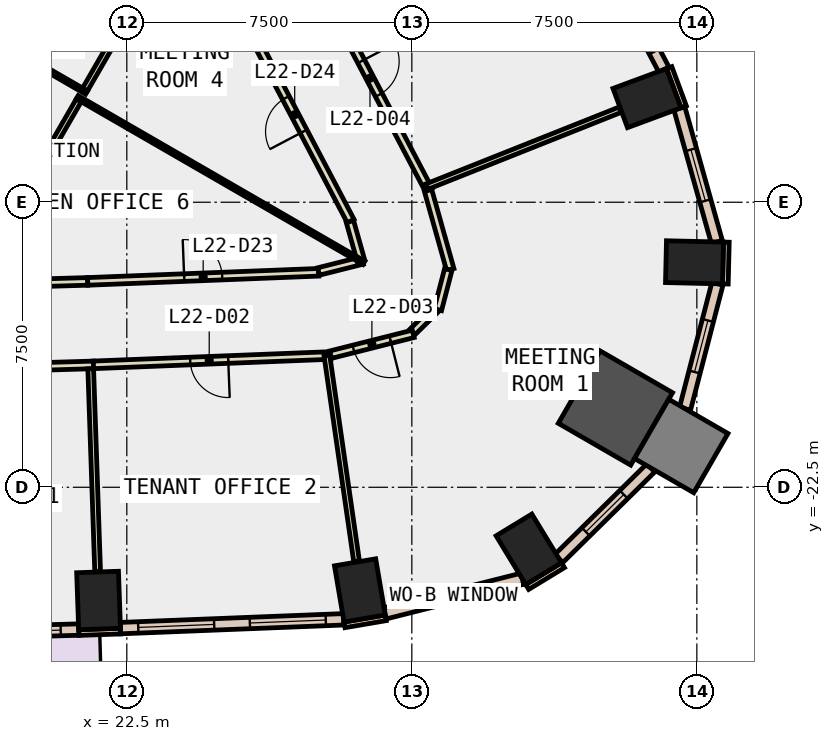
"""IFC4 building model, lengths in metres.
Left out: names, types, materials, properties, quantities, classifications, styles, units other than length and angle.
Written with IfcOpenShell. Run it as: python <this file> out.ifc"""

import sys

from ifc_helpers import new_model, si_unit, direction, frame, frame_2d, origin, origin_2d, place, context, subcontext, project, spatial, rectangle, extrude, element, fill, save


model = new_model("IFC4")
c1 = context("Model", 3, precision=1e-05, world=origin(), true_north=direction((0.0, 1.0)))
c2 = subcontext(c1, "Body", "Model", "MODEL_VIEW")
j1 = project(units=[si_unit("LENGTHUNIT", "METRE"), si_unit("PLANEANGLEUNIT", "RADIAN")], contexts=[c1])
p1 = place(None, origin())
s1 = spatial("IfcSite", under=j1, at=p1, CompositionType="ELEMENT")
p2 = place(p1, origin())
s2 = spatial("IfcBuilding", under=s1, at=p2, CompositionType="ELEMENT")
p3 = place(p2, frame((0.0, 0.0, 103.4)))
s3 = spatial("IfcBuildingStorey", under=s2, at=p3, CompositionType="ELEMENT", Elevation=103.4)
for number, where, z_axis, x_axis in (
    (1, (21.757, -25.479, -0.4), (0.0, 0.0, 1.0), (0.999, 0.035, 0.0)),
    (2, (28.633, -25.214, -0.4), (0.0, 0.0, 1.0), (0.986, 0.168, 0.0)),
    (3, (33.078, -24.132, -0.4), (0.0, 0.0, 1.0), (0.854, 0.52, 0.0)),
):
    element("IfcColumn", number, at=place(p3, frame(where, z_axis=z_axis, x_axis=x_axis)), inside=s3, PredefinedType="COLUMN", context=c2, shape_type="SweptSolid", body=[
        extrude(rectangle(XDim=1.1, YDim=1.5, at=origin_2d()), origin(), (0.0, 0.0, 1.0), 4.2),
    ])
p4 = place(p3, frame((35.357, -20.414, -0.4), z_axis=(0.0, 0.0, 1.0), x_axis=(-0.866025403784, 0.5, 0.0)))
e4 = element("IfcColumn", 4, at=p4, inside=s3, PredefinedType="COLUMN", context=c2, shape_type="SweptSolid", body=[
    extrude(rectangle(XDim=2.2, YDim=2.2, at=origin_2d()), origin(), (0.0, 0.0, 1.0), 4.2),
])
for number, where, z_axis, x_axis in (
    (5, (37.438, -16.581, -0.4), (0.0, 0.0, 1.0), (0.023, 1.0, 0.0)),
    (6, (36.188, -12.261, -0.4), (0.0, 0.0, 1.0), (-0.347, 0.938, 0.0)),
):
    element("IfcColumn", number, at=place(p3, frame(where, z_axis=z_axis, x_axis=x_axis)), inside=s3, PredefinedType="COLUMN", context=c2, shape_type="SweptSolid", body=[
        extrude(rectangle(XDim=1.1, YDim=1.5, at=origin_2d()), origin(), (0.0, 0.0, 1.0), 4.2),
    ])
p5 = place(p3, frame((37.089, -21.414, -0.4), z_axis=(0.0, 0.0, 1.0), x_axis=(-0.866025403784, 0.5, 0.0)))
e7 = element("IfcColumn", 7, at=p5, inside=s3, PredefinedType="COLUMN", context=c2, shape_type="SweptSolid", body=[
    extrude(rectangle(XDim=1.8, YDim=1.8, at=origin_2d()), origin(), (0.0, 0.0, 1.0), 4.2),
])
p6 = place(p3, frame((37.153, -12.49, 0.0), z_axis=(0.0, 0.0, 1.0), x_axis=(-0.347205967468, 0.937788897436, 0.0)))
e8 = element("IfcWall", 8, at=p6, inside=s3, PredefinedType="STANDARD", context=c2, shape_type="SweptSolid", body=[
    extrude(rectangle(XDim=1.1, YDim=0.15, at=frame_2d((0.55, 0.0))), origin(), (0.0, 0.0, 1.0), 3.8),
])
p7 = place(p3, frame((21.237, -26.323, 0.0), z_axis=(0.0, 0.0, 1.0), x_axis=(0.999368780235, 0.035525217693, 0.0)))
e9 = element("IfcWall", 9, at=p7, inside=s3, PredefinedType="STANDARD", context=c2, shape_type="SweptSolid", body=[
    extrude(rectangle(XDim=1.1, YDim=0.15, at=frame_2d((0.55, 0.0))), origin(), (0.0, 0.0, 1.0), 3.8),
])
p8 = place(p3, frame((28.229, -26.12, 0.0), z_axis=(0.0, 0.0, 1.0), x_axis=(0.985763338892, 0.168138751323, 0.0)))
e10 = element("IfcWall", 10, at=p8, inside=s3, PredefinedType="STANDARD", context=c2, shape_type="SweptSolid", body=[
    extrude(rectangle(XDim=1.101, YDim=0.15, at=frame_2d((0.55, 0.0))), origin(), (0.0, 0.0, 1.0), 3.8),
])
p9 = place(p3, frame((33.037, -25.123, 0.0), z_axis=(0.0, 0.0, 1.0), x_axis=(0.854245682901, 0.519869515594, 0.0)))
e11 = element("IfcWall", 11, at=p9, inside=s3, PredefinedType="STANDARD", context=c2, shape_type="SweptSolid", body=[
    extrude(rectangle(XDim=1.1, YDim=0.15, at=frame_2d((0.55, 0.0))), origin(), (0.0, 0.0, 1.0), 3.8),
])
p10 = place(p3, frame((38.25, -17.15, 0.0), z_axis=(0.0, 0.0, 1.0), x_axis=(0.023522901136, 0.999723298279, 0.0)))
e12 = element("IfcWall", 12, at=p10, inside=s3, PredefinedType="STANDARD", context=c2, shape_type="SweptSolid", body=[
    extrude(rectangle(XDim=1.1, YDim=0.15, at=frame_2d((0.55, 0.0))), origin(), (0.0, 0.0, 1.0), 3.8),
])
p11 = place(p3, frame((15.34, -26.413, 0.0), z_axis=(0.0, 0.0, 1.0), x_axis=(0.999588397616, 0.028688592709, 0.0)))
e13 = element("IfcWall", 13, at=p11, inside=s3, PredefinedType="STANDARD", context=c2, shape_type="SweptSolid", body=[
    extrude(rectangle(XDim=5.897, YDim=0.3, at=frame_2d((2.949, 0.0))), origin(), (0.0, 0.0, 1.0), 3.8),
])
p12 = place(p11, frame((0.474, 0.0, 0.0)))
e14 = element("IfcOpeningElement", 14, at=p12, cuts=e13, PredefinedType="OPENING", context=c2, shape_type="SweptSolid", body=[
    extrude(rectangle(XDim=2.0, YDim=2.4, at=frame_2d((1.0, 1.2))), frame((0.0, 0.16, 0.0), z_axis=(0.0, -1.0, 0.0), x_axis=(1.0, 0.0, 0.0)), (0.0, 0.0, 1.0), 0.32),
])
p13 = place(p11, frame((3.423, 0.0, 0.9)))
e15 = element("IfcOpeningElement", 15, at=p13, cuts=e13, PredefinedType="OPENING", context=c2, shape_type="SweptSolid", body=[
    extrude(rectangle(XDim=2.0, YDim=2.6, at=frame_2d((1.0, 1.3))), frame((0.0, 0.16, 0.0), z_axis=(0.0, -1.0, 0.0), x_axis=(1.0, 0.0, 0.0)), (0.0, 0.0, 1.0), 0.32),
])
p14 = place(p3, frame((22.332, -26.206, 0.0), z_axis=(0.0, 0.0, 1.0), x_axis=(0.99922113396, 0.039460428885, 0.0)))
e16 = element("IfcWall", 16, at=p14, inside=s3, PredefinedType="STANDARD", context=c2, shape_type="SweptSolid", body=[
    extrude(rectangle(XDim=5.878, YDim=0.3, at=frame_2d((2.939, 0.0))), origin(), (0.0, 0.0, 1.0), 3.8),
])
p15 = place(p14, frame((0.469, 0.0, 0.9)))
e17 = element("IfcOpeningElement", 17, at=p15, cuts=e16, PredefinedType="OPENING", context=c2, shape_type="SweptSolid", body=[
    extrude(rectangle(XDim=2.0, YDim=2.6, at=frame_2d((1.0, 1.3))), frame((0.0, 0.16, 0.0), z_axis=(0.0, -1.0, 0.0), x_axis=(1.0, 0.0, 0.0)), (0.0, 0.0, 1.0), 0.32),
])
p16 = place(p14, frame((3.408, 0.0, 0.9)))
e18 = element("IfcOpeningElement", 18, at=p16, cuts=e16, PredefinedType="OPENING", context=c2, shape_type="SweptSolid", body=[
    extrude(rectangle(XDim=2.0, YDim=2.6, at=frame_2d((1.0, 1.3))), frame((0.0, 0.16, 0.0), z_axis=(0.0, -1.0, 0.0), x_axis=(1.0, 0.0, 0.0)), (0.0, 0.0, 1.0), 0.32),
])
p17 = place(p3, frame((29.293, -25.818, 0.0), z_axis=(0.0, 0.0, 1.0), x_axis=(0.969658938481, 0.244461741432, 0.0)))
e19 = element("IfcWall", 19, at=p17, inside=s3, PredefinedType="STANDARD", context=c2, shape_type="SweptSolid", body=[
    extrude(rectangle(XDim=3.727, YDim=0.3, at=frame_2d((1.864, 0.0))), origin(), (0.0, 0.0, 1.0), 3.8),
])
p18 = place(p17, frame((1.164, 0.0, 0.9)))
e20 = element("IfcOpeningElement", 20, at=p18, cuts=e19, PredefinedType="OPENING", context=c2, shape_type="SweptSolid", body=[
    extrude(rectangle(XDim=1.4, YDim=2.6, at=frame_2d((0.7, 1.3))), frame((0.0, 0.16, 0.0), z_axis=(0.0, -1.0, 0.0), x_axis=(1.0, 0.0, 0.0)), (0.0, 0.0, 1.0), 0.32),
])
p19 = place(p3, frame((33.868, -24.374, 0.0), z_axis=(0.0, 0.0, 1.0), x_axis=(0.712546371703, 0.701625019631, 0.0)))
e21 = element("IfcWall", 21, at=p19, inside=s3, PredefinedType="STANDARD", context=c2, shape_type="SweptSolid", body=[
    extrude(rectangle(XDim=3.398, YDim=0.3, at=frame_2d((1.699, 0.0))), origin(), (0.0, 0.0, 1.0), 3.8),
])
p20 = place(p19, frame((0.999, 0.0, 0.9)))
e22 = element("IfcOpeningElement", 22, at=p20, cuts=e21, PredefinedType="OPENING", context=c2, shape_type="SweptSolid", body=[
    extrude(rectangle(XDim=1.4, YDim=2.6, at=frame_2d((0.7, 1.3))), frame((0.0, 0.16, 0.0), z_axis=(0.0, -1.0, 0.0), x_axis=(1.0, 0.0, 0.0)), (0.0, 0.0, 1.0), 0.32),
])
p21 = place(p3, frame((37.189, -20.433, 0.0), z_axis=(0.0, 0.0, 1.0), x_axis=(0.251046938153, 0.967974914367, 0.0)))
e23 = element("IfcWall", 23, at=p21, inside=s3, PredefinedType="STANDARD", context=c2, shape_type="SweptSolid", body=[
    extrude(rectangle(XDim=3.398, YDim=0.3, at=frame_2d((1.699, 0.0))), origin(), (0.0, 0.0, 1.0), 3.8),
])
p22 = place(p21, frame((0.999, 0.0, 0.9)))
e24 = element("IfcOpeningElement", 24, at=p22, cuts=e23, PredefinedType="OPENING", context=c2, shape_type="SweptSolid", body=[
    extrude(rectangle(XDim=1.4, YDim=2.6, at=frame_2d((0.7, 1.3))), frame((0.0, 0.16, 0.0), z_axis=(0.0, -1.0, 0.0), x_axis=(1.0, 0.0, 0.0)), (0.0, 0.0, 1.0), 0.32),
])
p23 = place(p3, frame((38.026, -16.046, 0.0), z_axis=(0.0, 0.0, 1.0), x_axis=(-0.270054089595, 0.96284515302, 0.0)))
e25 = element("IfcWall", 25, at=p23, inside=s3, PredefinedType="STANDARD", context=c2, shape_type="SweptSolid", body=[
    extrude(rectangle(XDim=3.651, YDim=0.3, at=frame_2d((1.825, 0.0))), origin(), (0.0, 0.0, 1.0), 3.8),
])
p24 = place(p23, frame((1.125, 0.0, 0.9)))
e26 = element("IfcOpeningElement", 26, at=p24, cuts=e25, PredefinedType="OPENING", context=c2, shape_type="SweptSolid", body=[
    extrude(rectangle(XDim=1.4, YDim=2.6, at=frame_2d((0.7, 1.3))), frame((0.0, 0.16, 0.0), z_axis=(0.0, -1.0, 0.0), x_axis=(1.0, 0.0, 0.0)), (0.0, 0.0, 1.0), 0.32),
])
p25 = place(p3, frame((36.633, -11.511, 0.0), z_axis=(0.0, 0.0, 1.0), x_axis=(-0.465380908665, 0.88511050714, 0.0)))
e27 = element("IfcWall", 27, at=p25, inside=s3, PredefinedType="STANDARD", context=c2, shape_type="SweptSolid", body=[
    extrude(rectangle(XDim=6.139, YDim=0.3, at=frame_2d((3.07, 0.0))), origin(), (0.0, 0.0, 1.0), 3.8),
])
p26 = place(p25, frame((0.535, 0.0, 0.9)))
e28 = element("IfcOpeningElement", 28, at=p26, cuts=e27, PredefinedType="OPENING", context=c2, shape_type="SweptSolid", body=[
    extrude(rectangle(XDim=2.0, YDim=2.6, at=frame_2d((1.0, 1.3))), frame((0.0, 0.16, 0.0), z_axis=(0.0, -1.0, 0.0), x_axis=(1.0, 0.0, 0.0)), (0.0, 0.0, 1.0), 0.32),
])
p27 = place(p25, frame((3.604, 0.0, 0.9)))
e29 = element("IfcOpeningElement", 29, at=p27, cuts=e27, PredefinedType="OPENING", context=c2, shape_type="SweptSolid", body=[
    extrude(rectangle(XDim=2.0, YDim=2.6, at=frame_2d((1.0, 1.3))), frame((0.0, 0.16, 0.0), z_axis=(0.0, -1.0, 0.0), x_axis=(1.0, 0.0, 0.0)), (0.0, 0.0, 1.0), 0.32),
])
p28 = place(p3, frame((18.509, -17.168, 0.0), z_axis=(0.0, 0.0, 1.0), x_axis=(0.999588854267, 0.028672677323, 0.0)))
e30 = element("IfcWall", 30, at=p28, inside=s3, PredefinedType="PARTITIONING", context=c2, shape_type="SweptSolid", body=[
    extrude(rectangle(XDim=2.963, YDim=0.2, at=frame_2d((1.481, 0.0))), origin(), (0.0, 0.0, 1.0), 3.8),
])
p29 = place(p3, frame((21.471, -17.083, 0.0), z_axis=(0.0, 0.0, 1.0), x_axis=(0.999221407079, 0.039453512338, 0.0)))
e31 = element("IfcWall", 31, at=p29, inside=s3, PredefinedType="PARTITIONING", context=c2, shape_type="SweptSolid", body=[
    extrude(rectangle(XDim=6.083, YDim=0.2, at=frame_2d((3.042, 0.0))), origin(), (0.0, 0.0, 1.0), 3.8),
])
p30 = place(p29, frame((2.541, 0.0, 0.0)))
e32 = element("IfcOpeningElement", 32, at=p30, cuts=e31, PredefinedType="OPENING", context=c2, shape_type="SweptSolid", body=[
    extrude(rectangle(XDim=1.0, YDim=2.1, at=frame_2d((0.5, 1.05))), frame((0.0, 0.11, 0.0), z_axis=(0.0, -1.0, 0.0), x_axis=(1.0, 0.0, 0.0)), (0.0, 0.0, 1.0), 0.22),
])
p31 = place(p3, frame((27.546, -16.822, 0.0), z_axis=(0.0, 0.0, 1.0), x_axis=(0.969694756333, 0.244319625777, 0.0)))
e33 = element("IfcWall", 33, at=p31, inside=s3, PredefinedType="PARTITIONING", context=c2, shape_type="SweptSolid", body=[
    extrude(rectangle(XDim=1.191, YDim=0.2, at=frame_2d((0.596, 0.0))), origin(), (0.0, 0.0, 1.0), 3.8),
])
p32 = place(p3, frame((28.662, -16.541, 0.0), z_axis=(0.0, 0.0, 1.0), x_axis=(-0.270771802087, 0.96264356394, 0.0)))
e34 = element("IfcWall", 34, at=p32, inside=s3, PredefinedType="PARTITIONING", context=c2, shape_type="SweptSolid", body=[
    extrude(rectangle(XDim=1.078, YDim=0.2, at=frame_2d((0.539, 0.0))), origin(), (0.0, 0.0, 1.0), 3.8),
])
p33 = place(p3, frame((28.39, -15.495, 0.0), z_axis=(0.0, 0.0, 1.0), x_axis=(-0.465367816287, 0.885117390838, 0.0)))
e35 = element("IfcWall", 35, at=p33, inside=s3, PredefinedType="PARTITIONING", context=c2, shape_type="SweptSolid", body=[
    extrude(rectangle(XDim=6.326, YDim=0.2, at=frame_2d((3.163, 0.0))), origin(), (0.0, 0.0, 1.0), 3.8),
])
p34 = place(p33, frame((2.663, 0.0, 0.0)))
e36 = element("IfcOpeningElement", 36, at=p34, cuts=e35, PredefinedType="OPENING", context=c2, shape_type="SweptSolid", body=[
    extrude(rectangle(XDim=1.0, YDim=2.1, at=frame_2d((0.5, 1.05))), frame((0.0, 0.11, 0.0), z_axis=(0.0, -1.0, 0.0), x_axis=(1.0, 0.0, 0.0)), (0.0, 0.0, 1.0), 0.22),
])
p35 = place(p3, frame((21.621, -19.28, 0.0), z_axis=(0.0, 0.0, 1.0), x_axis=(-0.999557957525, -0.029730280001, 0.0)))
e37 = element("IfcWall", 37, at=p35, inside=s3, PredefinedType="PARTITIONING", context=c2, shape_type="SweptSolid", body=[
    extrude(rectangle(XDim=13.927, YDim=0.2, at=frame_2d((6.964, 0.0))), origin(), (0.0, 0.0, 1.0), 3.8),
])
p36 = place(p35, frame((6.464, 0.0, 0.0)))
e38 = element("IfcOpeningElement", 38, at=p36, cuts=e37, PredefinedType="OPENING", context=c2, shape_type="SweptSolid", body=[
    extrude(rectangle(XDim=1.0, YDim=2.1, at=frame_2d((0.5, 1.05))), frame((0.0, 0.11, 0.0), z_axis=(0.0, -1.0, 0.0), x_axis=(1.0, 0.0, 0.0)), (0.0, 0.0, 1.0), 0.22),
])
p37 = place(p3, frame((27.865, -19.032, 0.0), z_axis=(0.0, 0.0, 1.0), x_axis=(-0.999218029978, -0.039538950003, 0.0)))
e39 = element("IfcWall", 39, at=p37, inside=s3, PredefinedType="PARTITIONING", context=c2, shape_type="SweptSolid", body=[
    extrude(rectangle(XDim=6.249, YDim=0.2, at=frame_2d((3.125, 0.0))), origin(), (0.0, 0.0, 1.0), 3.8),
])
p38 = place(p37, frame((2.699, 0.0, 0.0)))
e40 = element("IfcOpeningElement", 40, at=p38, cuts=e39, PredefinedType="OPENING", context=c2, shape_type="SweptSolid", body=[
    extrude(rectangle(XDim=1.0, YDim=2.1, at=frame_2d((0.5, 1.05))), frame((0.0, 0.11, 0.0), z_axis=(0.0, -1.0, 0.0), x_axis=(1.0, 0.0, 0.0)), (0.0, 0.0, 1.0), 0.22),
])
p39 = place(p3, frame((30.426, -14.685, 0.0), z_axis=(0.0, 0.0, 1.0), x_axis=(0.270131711391, -0.962823378664, 0.0)))
e41 = element("IfcWall", 41, at=p39, inside=s3, PredefinedType="PARTITIONING", context=c2, shape_type="SweptSolid", body=[
    extrude(rectangle(XDim=2.166, YDim=0.2, at=frame_2d((1.083, 0.0))), origin(), (0.0, 0.0, 1.0), 3.8),
])
p40 = place(p3, frame((30.959, -16.771, 0.0), z_axis=(0.0, 0.0, 1.0), x_axis=(-0.251109729392, -0.967958627114, 0.0)))
e42 = element("IfcWall", 42, at=p40, inside=s3, PredefinedType="PARTITIONING", context=c2, shape_type="SweptSolid", body=[
    extrude(rectangle(XDim=1.091, YDim=0.2, at=frame_2d((0.545, 0.0))), origin(), (0.0, 0.0, 1.0), 3.8),
])
p41 = place(p3, frame((30.639, -17.801, 0.0), z_axis=(0.0, 0.0, 1.0), x_axis=(-0.713329122722, -0.700829196507, 0.0)))
e43 = element("IfcWall", 43, at=p41, inside=s3, PredefinedType="PARTITIONING", context=c2, shape_type="SweptSolid", body=[
    extrude(rectangle(XDim=0.879, YDim=0.2, at=frame_2d((0.439, 0.0))), origin(), (0.0, 0.0, 1.0), 3.8),
])
p42 = place(p3, frame((30.037, -18.463, 0.0), z_axis=(0.0, 0.0, 1.0), x_axis=(-0.969686214682, -0.244353524746, 0.0)))
e44 = element("IfcWall", 44, at=p42, inside=s3, PredefinedType="PARTITIONING", context=c2, shape_type="SweptSolid", body=[
    extrude(rectangle(XDim=2.243, YDim=0.2, at=frame_2d((1.122, 0.0))), origin(), (0.0, 0.0, 1.0), 3.8),
])
p43 = place(p42, frame((0.622, 0.0, 0.0)))
e45 = element("IfcOpeningElement", 45, at=p43, cuts=e44, PredefinedType="OPENING", context=c2, shape_type="SweptSolid", body=[
    extrude(rectangle(XDim=1.0, YDim=2.1, at=frame_2d((0.5, 1.05))), frame((0.0, 0.11, 0.0), z_axis=(0.0, -1.0, 0.0), x_axis=(1.0, 0.0, 0.0)), (0.0, 0.0, 1.0), 0.22),
])
p44 = place(p3, frame((27.353, -8.794, 0.0), z_axis=(0.0, 0.0, 1.0), x_axis=(0.465239168813, -0.885185017836, 0.0)))
e46 = element("IfcWall", 46, at=p44, inside=s3, PredefinedType="PARTITIONING", context=c2, shape_type="SweptSolid", body=[
    extrude(rectangle(XDim=6.646, YDim=0.2, at=frame_2d((3.323, 0.0))), origin(), (0.0, 0.0, 1.0), 3.8),
])
p45 = place(p44, frame((2.823, 0.0, 0.0)))
e47 = element("IfcOpeningElement", 47, at=p45, cuts=e46, PredefinedType="OPENING", context=c2, shape_type="SweptSolid", body=[
    extrude(rectangle(XDim=1.0, YDim=2.1, at=frame_2d((0.5, 1.05))), frame((0.0, 0.11, 0.0), z_axis=(0.0, -1.0, 0.0), x_axis=(1.0, 0.0, 0.0)), (0.0, 0.0, 1.0), 0.22),
])
p46 = place(p3, frame((17.219, -9.676, 0.0), z_axis=(0.0, 0.0, 1.0), x_axis=(0.86598459596, -0.500070674565, 0.0)))
e48 = element("IfcWall", 48, at=p46, inside=s3, PredefinedType="PARTITIONING", context=c2, shape_type="SweptSolid", body=[
    extrude(rectangle(XDim=4.875, YDim=0.1, at=frame_2d((2.438, 0.0))), origin(), (0.0, 0.0, 1.0), 3.8),
])
p47 = place(p3, frame((21.236, -12.319, 0.0), z_axis=(0.0, 0.0, 1.0), x_axis=(-0.500016488359, -0.866015884017, 0.0)))
e49 = element("IfcWall", 49, at=p47, inside=s3, PredefinedType="PARTITIONING", context=c2, shape_type="SweptSolid", body=[
    extrude(rectangle(XDim=5.702, YDim=0.15, at=frame_2d((2.851, 0.0))), origin(), (0.0, 0.0, 1.0), 3.8),
])
p48 = place(p3, frame((24.137, -7.294, 0.0), z_axis=(0.0, 0.0, 1.0), x_axis=(-0.500001804394, -0.866024362014, 0.0)))
e50 = element("IfcWall", 50, at=p48, inside=s3, PredefinedType="PARTITIONING", context=c2, shape_type="SweptSolid", body=[
    extrude(rectangle(XDim=5.472, YDim=0.15, at=frame_2d((2.736, 0.0))), origin(), (0.0, 0.0, 1.0), 3.8),
])
p49 = place(p3, frame((21.196, -12.238, 0.0), z_axis=(0.0, 0.0, 1.0), x_axis=(0.866023145199, -0.500003911965, 0.0)))
e51 = element("IfcWall", 51, at=p49, inside=s3, PredefinedType="PARTITIONING", context=c2, shape_type="SweptSolid", body=[
    extrude(rectangle(XDim=8.71, YDim=0.1, at=frame_2d((4.355, 0.0))), origin(), (0.0, 0.0, 1.0), 3.8),
])
p50 = place(p3, frame((21.55, -19.382, 0.0), z_axis=(0.0, 0.0, 1.0), x_axis=(0.034124666577, -0.999417583961, 0.0)))
e52 = element("IfcWall", 52, at=p50, inside=s3, PredefinedType="PARTITIONING", context=c2, shape_type="SweptSolid", body=[
    extrude(rectangle(XDim=5.33, YDim=0.15, at=frame_2d((2.665, 0.0))), origin(), (0.0, 0.0, 1.0), 3.8),
])
p51 = place(p3, frame((27.765, -19.036, 0.0), z_axis=(0.0, 0.0, 1.0), x_axis=(0.142827612329, -0.989747580526, 0.0)))
e53 = element("IfcWall", 53, at=p51, inside=s3, PredefinedType="PARTITIONING", context=c2, shape_type="SweptSolid", body=[
    extrude(rectangle(XDim=5.468, YDim=0.15, at=frame_2d((2.734, 0.0))), origin(), (0.0, 0.0, 1.0), 3.8),
])
p52 = place(p3, frame((30.399, -14.588, 0.0), z_axis=(0.0, 0.0, 1.0), x_axis=(0.92913411584, 0.36974287658, 0.0)))
e54 = element("IfcWall", 54, at=p52, inside=s3, PredefinedType="PARTITIONING", context=c2, shape_type="SweptSolid", body=[
    extrude(rectangle(XDim=5.469, YDim=0.15, at=frame_2d((2.734, 0.0))), origin(), (0.0, 0.0, 1.0), 3.8),
])
p53 = place(p13, origin())
e55 = element("IfcWindow", 55, at=p53, inside=s3, PartitioningType="SINGLE_PANEL", PredefinedType="WINDOW", context=c2, shape_type="SweptSolid", body=[
    extrude(rectangle(XDim=2.0, YDim=2.6, at=frame_2d((1.0, 1.3))), frame((0.0, 0.03, 0.0), z_axis=(0.0, -1.0, 0.0), x_axis=(1.0, 0.0, 0.0)), (0.0, 0.0, 1.0), 0.06),
])
fill(e15, e55)
p54 = place(p15, origin())
e56 = element("IfcWindow", 56, at=p54, inside=s3, PartitioningType="SINGLE_PANEL", PredefinedType="WINDOW", context=c2, shape_type="SweptSolid", body=[
    extrude(rectangle(XDim=2.0, YDim=2.6, at=frame_2d((1.0, 1.3))), frame((0.0, 0.03, 0.0), z_axis=(0.0, -1.0, 0.0), x_axis=(1.0, 0.0, 0.0)), (0.0, 0.0, 1.0), 0.06),
])
fill(e17, e56)
p55 = place(p16, origin())
e57 = element("IfcWindow", 57, at=p55, inside=s3, PartitioningType="SINGLE_PANEL", PredefinedType="WINDOW", context=c2, shape_type="SweptSolid", body=[
    extrude(rectangle(XDim=2.0, YDim=2.6, at=frame_2d((1.0, 1.3))), frame((0.0, 0.03, 0.0), z_axis=(0.0, -1.0, 0.0), x_axis=(1.0, 0.0, 0.0)), (0.0, 0.0, 1.0), 0.06),
])
fill(e18, e57)
p56 = place(p18, origin())
e58 = element("IfcWindow", 58, at=p56, inside=s3, PartitioningType="SINGLE_PANEL", PredefinedType="WINDOW", context=c2, shape_type="SweptSolid", body=[
    extrude(rectangle(XDim=1.4, YDim=2.6, at=frame_2d((0.7, 1.3))), frame((0.0, 0.03, 0.0), z_axis=(0.0, -1.0, 0.0), x_axis=(1.0, 0.0, 0.0)), (0.0, 0.0, 1.0), 0.06),
])
fill(e20, e58)
p57 = place(p20, origin())
e59 = element("IfcWindow", 59, at=p57, inside=s3, PartitioningType="SINGLE_PANEL", PredefinedType="WINDOW", context=c2, shape_type="SweptSolid", body=[
    extrude(rectangle(XDim=1.4, YDim=2.6, at=frame_2d((0.7, 1.3))), frame((0.0, 0.03, 0.0), z_axis=(0.0, -1.0, 0.0), x_axis=(1.0, 0.0, 0.0)), (0.0, 0.0, 1.0), 0.06),
])
fill(e22, e59)
p58 = place(p22, origin())
e60 = element("IfcWindow", 60, at=p58, inside=s3, PartitioningType="SINGLE_PANEL", PredefinedType="WINDOW", context=c2, shape_type="SweptSolid", body=[
    extrude(rectangle(XDim=1.4, YDim=2.6, at=frame_2d((0.7, 1.3))), frame((0.0, 0.03, 0.0), z_axis=(0.0, -1.0, 0.0), x_axis=(1.0, 0.0, 0.0)), (0.0, 0.0, 1.0), 0.06),
])
fill(e24, e60)
p59 = place(p24, origin())
e61 = element("IfcWindow", 61, at=p59, inside=s3, PartitioningType="SINGLE_PANEL", PredefinedType="WINDOW", context=c2, shape_type="SweptSolid", body=[
    extrude(rectangle(XDim=1.4, YDim=2.6, at=frame_2d((0.7, 1.3))), frame((0.0, 0.03, 0.0), z_axis=(0.0, -1.0, 0.0), x_axis=(1.0, 0.0, 0.0)), (0.0, 0.0, 1.0), 0.06),
])
fill(e26, e61)
p60 = place(p38, origin())
e62 = element("IfcDoor", 62, at=p60, inside=s3, OperationType="SINGLE_SWING_LEFT", PredefinedType="DOOR", context=c2, shape_type="SweptSolid", body=[
    extrude(rectangle(XDim=1.0, YDim=2.1, at=frame_2d((0.5, 1.05))), frame((0.0, 0.025, 0.0), z_axis=(0.0, -1.0, 0.0), x_axis=(1.0, 0.0, 0.0)), (0.0, 0.0, 1.0), 0.05),
])
fill(e40, e62)
p61 = place(p43, origin())
e63 = element("IfcDoor", 63, at=p61, inside=s3, OperationType="SINGLE_SWING_LEFT", PredefinedType="DOOR", context=c2, shape_type="SweptSolid", body=[
    extrude(rectangle(XDim=1.0, YDim=2.1, at=frame_2d((0.5, 1.05))), frame((0.0, 0.025, 0.0), z_axis=(0.0, -1.0, 0.0), x_axis=(1.0, 0.0, 0.0)), (0.0, 0.0, 1.0), 0.05),
])
fill(e45, e63)
p62 = place(p45, origin())
e64 = element("IfcDoor", 64, at=p62, inside=s3, OperationType="SINGLE_SWING_LEFT", PredefinedType="DOOR", context=c2, shape_type="SweptSolid", body=[
    extrude(rectangle(XDim=1.0, YDim=2.1, at=frame_2d((0.5, 1.05))), frame((0.0, 0.025, 0.0), z_axis=(0.0, -1.0, 0.0), x_axis=(1.0, 0.0, 0.0)), (0.0, 0.0, 1.0), 0.05),
])
fill(e47, e64)
p63 = place(p30, origin())
e65 = element("IfcDoor", 65, at=p63, inside=s3, OperationType="SINGLE_SWING_LEFT", PredefinedType="DOOR", context=c2, shape_type="SweptSolid", body=[
    extrude(rectangle(XDim=1.0, YDim=2.1, at=frame_2d((0.5, 1.05))), frame((0.0, 0.025, 0.0), z_axis=(0.0, -1.0, 0.0), x_axis=(1.0, 0.0, 0.0)), (0.0, 0.0, 1.0), 0.05),
])
fill(e32, e65)
p64 = place(p34, origin())
e66 = element("IfcDoor", 66, at=p64, inside=s3, OperationType="SINGLE_SWING_LEFT", PredefinedType="DOOR", context=c2, shape_type="SweptSolid", body=[
    extrude(rectangle(XDim=1.0, YDim=2.1, at=frame_2d((0.5, 1.05))), frame((0.0, 0.025, 0.0), z_axis=(0.0, -1.0, 0.0), x_axis=(1.0, 0.0, 0.0)), (0.0, 0.0, 1.0), 0.05),
])
fill(e36, e66)
save(model, sys.argv[1])
